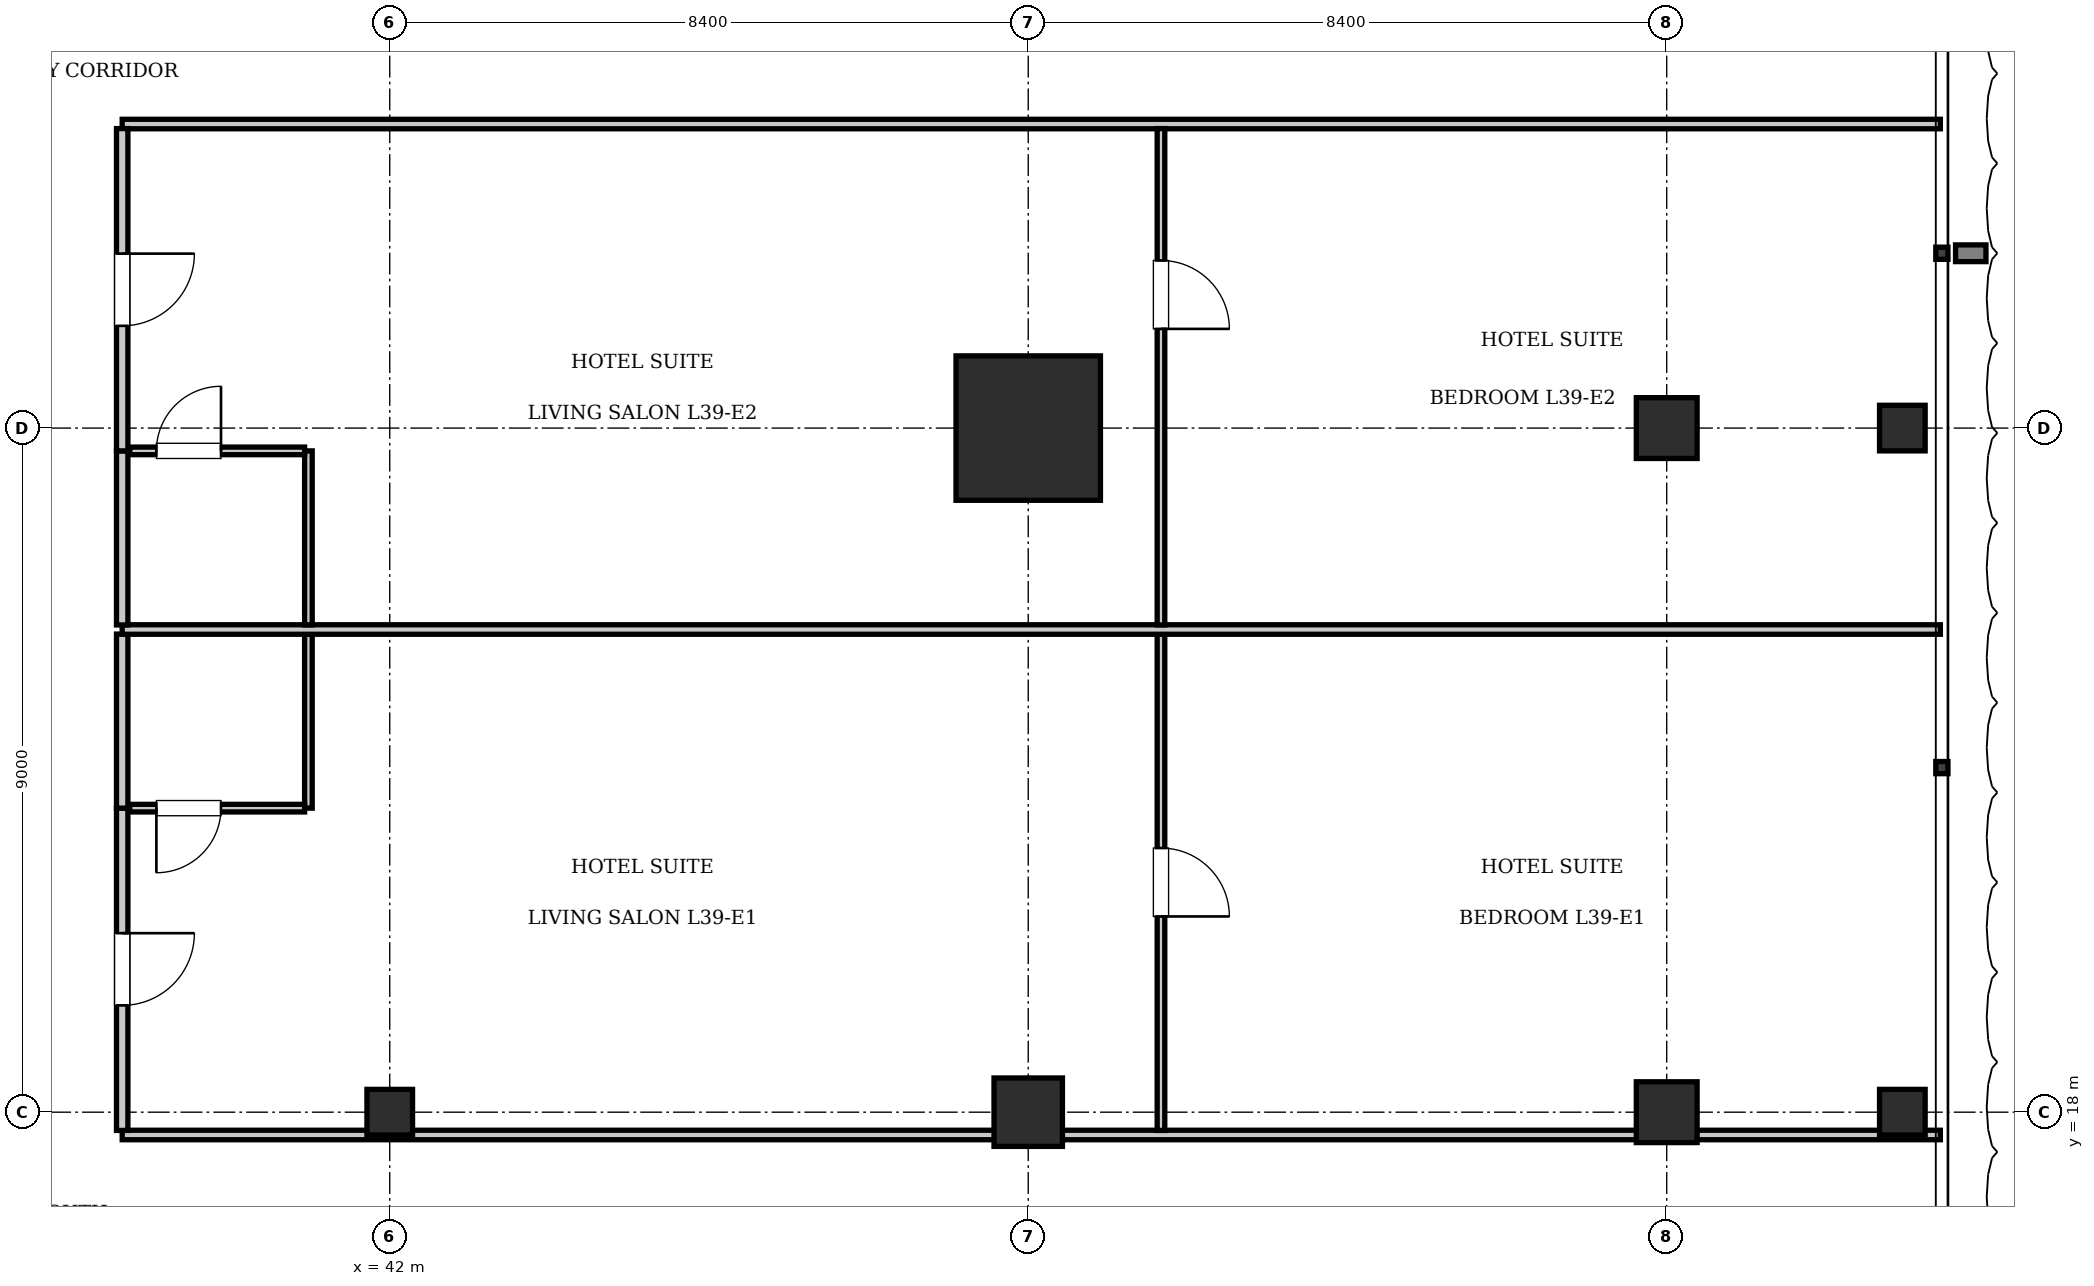
"""IFC4 building model, lengths in metres.
Left out: names, types, materials, properties, quantities, classifications, styles, units other than length and angle.
Written with IfcOpenShell. Run it as: python <this file> out.ifc"""

import sys

from ifc_helpers import new_model, si_unit, direction, frame, frame_2d, origin, origin_2d, place, context, subcontext, project, spatial, rectangle, i_section, extrude, element, fill, save


model = new_model("IFC4")
c1 = context("Model", 3, precision=1e-05, world=origin(), true_north=direction((0.0, 1.0)))
c2 = subcontext(c1, "Body", "Model", "MODEL_VIEW")
j1 = project(units=[si_unit("LENGTHUNIT", "METRE"), si_unit("PLANEANGLEUNIT", "RADIAN")], contexts=[c1])
p1 = place(None, origin())
s1 = spatial("IfcSite", under=j1, at=p1, CompositionType="ELEMENT")
p2 = place(p1, origin())
s2 = spatial("IfcBuilding", under=s1, at=p2, CompositionType="ELEMENT")
p3 = place(p2, frame((0.0, 0.0, 162.05)))
s3 = spatial("IfcBuildingStorey", under=s2, at=p3, CompositionType="ELEMENT", Elevation=162.05)
p4 = place(p3, frame((50.4, 27.0, 0.0), z_axis=(0.0, 0.0, 1.0), x_axis=(1.0, 0.0, 0.0)))
e1 = element("IfcColumn", 1, at=p4, inside=s3, PredefinedType="COLUMN", context=c2, shape_type="SweptSolid", body=[
    extrude(rectangle(XDim=1.9, YDim=1.9, at=origin_2d()), origin(), (0.0, 0.0, 1.0), 3.85),
])
p5 = place(p3, frame((50.4, 18.0, 0.0), z_axis=(0.0, 0.0, 1.0), x_axis=(1.0, 0.0, 0.0)))
e2 = element("IfcColumn", 2, at=p5, inside=s3, PredefinedType="COLUMN", context=c2, shape_type="SweptSolid", body=[
    extrude(rectangle(XDim=0.9, YDim=0.9, at=origin_2d()), origin(), (0.0, 0.0, 1.0), 3.85),
])
p6 = place(p3, frame((42.0, 18.0, 0.0), z_axis=(0.0, 0.0, 1.0), x_axis=(1.0, 0.0, 0.0)))
e3 = element("IfcColumn", 3, at=p6, inside=s3, PredefinedType="COLUMN", context=c2, shape_type="SweptSolid", body=[
    extrude(i_section(OverallWidth=0.6, OverallDepth=0.6, WebThickness=0.025, FlangeThickness=0.038, at=origin_2d()), origin(), (0.0, 0.0, 1.0), 3.85),
])
for number, where, z_axis, x_axis in (
    (4, (58.8, 18.0, 0.0), (0.0, 0.0, 1.0), (1.0, 0.0, 0.0)),
    (5, (58.8, 27.0, 0.0), (0.0, 0.0, 1.0), (1.0, 0.0, 0.0)),
):
    element("IfcColumn", number, at=place(p3, frame(where, z_axis=z_axis, x_axis=x_axis)), inside=s3, PredefinedType="COLUMN", context=c2, shape_type="SweptSolid", body=[
        extrude(rectangle(XDim=0.8, YDim=0.8, at=origin_2d()), origin(), (0.0, 0.0, 1.0), 3.85),
    ])
for number, where, z_axis, x_axis in (
    (6, (61.9, 18.0, 0.0), (0.0, 0.0, 1.0), (1.0, 0.0, 0.0)),
    (7, (61.9, 27.0, 0.0), (0.0, 0.0, 1.0), (1.0, 0.0, 0.0)),
):
    element("IfcColumn", number, at=place(p3, frame(where, z_axis=z_axis, x_axis=x_axis)), inside=s3, PredefinedType="COLUMN", context=c2, shape_type="SweptSolid", body=[
        extrude(i_section(OverallWidth=0.6, OverallDepth=0.6, WebThickness=0.025, FlangeThickness=0.038, at=origin_2d()), origin(), (0.0, 0.0, 1.0), 3.85),
    ])
for number, where, z_axis, x_axis in (
    (8, (38.48, 17.7, 0.0), (0.0, 0.0, 1.0), (1.0, 0.0, 0.0)),
    (9, (38.48, 31.0, 0.0), (0.0, 0.0, 1.0), (1.0, 0.0, 0.0)),
):
    element("IfcWall", number, at=place(p3, frame(where, z_axis=z_axis, x_axis=x_axis)), inside=s3, PredefinedType="PARTITIONING", context=c2, shape_type="SweptSolid", body=[
        extrude(rectangle(XDim=23.92, YDim=0.125, at=frame_2d((11.96, 0.0))), origin(), (0.0, 0.0, 1.0), 3.61),
    ])
p7 = place(p3, frame((38.48, 17.76, 0.0), z_axis=(0.0, 0.0, 1.0), x_axis=(0.0, 1.0, 0.0)))
e10 = element("IfcWall", 10, at=p7, inside=s3, PredefinedType="PARTITIONING", context=c2, shape_type="SweptSolid", body=[
    extrude(rectangle(XDim=4.24, YDim=0.15, at=frame_2d((2.12, 0.0))), origin(), (0.0, 0.0, 1.0), 3.61),
])
p8 = place(p7, frame((1.645, 0.0, 0.0)))
e11 = element("IfcOpeningElement", 11, at=p8, cuts=e10, PredefinedType="OPENING", context=c2, shape_type="SweptSolid", body=[
    extrude(rectangle(XDim=0.95, YDim=2.15, at=frame_2d((0.475, 1.075))), frame((0.0, 0.085, 0.0), z_axis=(0.0, -1.0, 0.0), x_axis=(1.0, 0.0, 0.0)), (0.0, 0.0, 1.0), 0.17),
])
p9 = place(p3, frame((38.48, 22.0, 0.0), z_axis=(0.0, 0.0, 1.0), x_axis=(0.0, 1.0, 0.0)))
e12 = element("IfcWall", 12, at=p9, inside=s3, PredefinedType="PARTITIONING", context=c2, shape_type="SweptSolid", body=[
    extrude(rectangle(XDim=2.29, YDim=0.15, at=frame_2d((1.145, 0.0))), origin(), (0.0, 0.0, 1.0), 3.61),
])
p10 = place(p3, frame((40.93, 22.0, 0.0), z_axis=(0.0, 0.0, 1.0), x_axis=(0.0, 1.0, 0.0)))
e13 = element("IfcWall", 13, at=p10, inside=s3, PredefinedType="PARTITIONING", context=c2, shape_type="SweptSolid", body=[
    extrude(rectangle(XDim=2.29, YDim=0.1, at=frame_2d((1.145, 0.0))), origin(), (0.0, 0.0, 1.0), 3.61),
])
p11 = place(p3, frame((38.58, 22.0, 0.0), z_axis=(0.0, 0.0, 1.0), x_axis=(1.0, 0.0, 0.0)))
e14 = element("IfcWall", 14, at=p11, inside=s3, PredefinedType="PARTITIONING", context=c2, shape_type="SweptSolid", body=[
    extrude(rectangle(XDim=2.3, YDim=0.1, at=frame_2d((1.15, 0.0))), origin(), (0.0, 0.0, 1.0), 3.61),
])
p12 = place(p11, frame((0.35, 0.0, 0.0)))
e15 = element("IfcOpeningElement", 15, at=p12, cuts=e14, PredefinedType="OPENING", context=c2, shape_type="SweptSolid", body=[
    extrude(rectangle(XDim=0.85, YDim=2.1, at=frame_2d((0.425, 1.05))), frame((0.0, 0.06, 0.0), z_axis=(0.0, -1.0, 0.0), x_axis=(1.0, 0.0, 0.0)), (0.0, 0.0, 1.0), 0.12),
])
p13 = place(p3, frame((52.146, 17.76, 0.0), z_axis=(0.0, 0.0, 1.0), x_axis=(0.0, 1.0, 0.0)))
e16 = element("IfcWall", 16, at=p13, inside=s3, PredefinedType="PARTITIONING", context=c2, shape_type="SweptSolid", body=[
    extrude(rectangle(XDim=6.53, YDim=0.1, at=frame_2d((3.265, 0.0))), origin(), (0.0, 0.0, 1.0), 3.61),
])
p14 = place(p13, frame((2.815, 0.0, 0.0)))
e17 = element("IfcOpeningElement", 17, at=p14, cuts=e16, PredefinedType="OPENING", context=c2, shape_type="SweptSolid", body=[
    extrude(rectangle(XDim=0.9, YDim=2.1, at=frame_2d((0.45, 1.05))), frame((0.0, 0.06, 0.0), z_axis=(0.0, -1.0, 0.0), x_axis=(1.0, 0.0, 0.0)), (0.0, 0.0, 1.0), 0.12),
])
p15 = place(p3, frame((38.48, 24.35, 0.0), z_axis=(0.0, 0.0, 1.0), x_axis=(1.0, 0.0, 0.0)))
e18 = element("IfcWall", 18, at=p15, inside=s3, PredefinedType="PARTITIONING", context=c2, shape_type="SweptSolid", body=[
    extrude(rectangle(XDim=23.92, YDim=0.125, at=frame_2d((11.96, 0.0))), origin(), (0.0, 0.0, 1.0), 3.61),
])
p16 = place(p3, frame((38.48, 24.41, 0.0), z_axis=(0.0, 0.0, 1.0), x_axis=(0.0, 1.0, 0.0)))
e19 = element("IfcWall", 19, at=p16, inside=s3, PredefinedType="PARTITIONING", context=c2, shape_type="SweptSolid", body=[
    extrude(rectangle(XDim=2.29, YDim=0.15, at=frame_2d((1.145, 0.0))), origin(), (0.0, 0.0, 1.0), 3.61),
])
p17 = place(p3, frame((38.48, 26.7, 0.0), z_axis=(0.0, 0.0, 1.0), x_axis=(0.0, 1.0, 0.0)))
e20 = element("IfcWall", 20, at=p17, inside=s3, PredefinedType="PARTITIONING", context=c2, shape_type="SweptSolid", body=[
    extrude(rectangle(XDim=4.24, YDim=0.15, at=frame_2d((2.12, 0.0))), origin(), (0.0, 0.0, 1.0), 3.61),
])
p18 = place(p17, frame((1.645, 0.0, 0.0)))
e21 = element("IfcOpeningElement", 21, at=p18, cuts=e20, PredefinedType="OPENING", context=c2, shape_type="SweptSolid", body=[
    extrude(rectangle(XDim=0.95, YDim=2.15, at=frame_2d((0.475, 1.075))), frame((0.0, 0.085, 0.0), z_axis=(0.0, -1.0, 0.0), x_axis=(1.0, 0.0, 0.0)), (0.0, 0.0, 1.0), 0.17),
])
p19 = place(p3, frame((40.93, 24.41, 0.0), z_axis=(0.0, 0.0, 1.0), x_axis=(0.0, 1.0, 0.0)))
e22 = element("IfcWall", 22, at=p19, inside=s3, PredefinedType="PARTITIONING", context=c2, shape_type="SweptSolid", body=[
    extrude(rectangle(XDim=2.29, YDim=0.1, at=frame_2d((1.145, 0.0))), origin(), (0.0, 0.0, 1.0), 3.61),
])
p20 = place(p3, frame((38.58, 26.7, 0.0), z_axis=(0.0, 0.0, 1.0), x_axis=(1.0, 0.0, 0.0)))
e23 = element("IfcWall", 23, at=p20, inside=s3, PredefinedType="PARTITIONING", context=c2, shape_type="SweptSolid", body=[
    extrude(rectangle(XDim=2.3, YDim=0.1, at=frame_2d((1.15, 0.0))), origin(), (0.0, 0.0, 1.0), 3.61),
])
p21 = place(p20, frame((0.35, 0.0, 0.0)))
e24 = element("IfcOpeningElement", 24, at=p21, cuts=e23, PredefinedType="OPENING", context=c2, shape_type="SweptSolid", body=[
    extrude(rectangle(XDim=0.85, YDim=2.1, at=frame_2d((0.425, 1.05))), frame((0.0, 0.06, 0.0), z_axis=(0.0, -1.0, 0.0), x_axis=(1.0, 0.0, 0.0)), (0.0, 0.0, 1.0), 0.12),
])
p22 = place(p3, frame((52.146, 24.41, 0.0), z_axis=(0.0, 0.0, 1.0), x_axis=(0.0, 1.0, 0.0)))
e25 = element("IfcWall", 25, at=p22, inside=s3, PredefinedType="PARTITIONING", context=c2, shape_type="SweptSolid", body=[
    extrude(rectangle(XDim=6.53, YDim=0.1, at=frame_2d((3.265, 0.0))), origin(), (0.0, 0.0, 1.0), 3.61),
])
p23 = place(p22, frame((3.895, 0.0, 0.0)))
e26 = element("IfcOpeningElement", 26, at=p23, cuts=e25, PredefinedType="OPENING", context=c2, shape_type="SweptSolid", body=[
    extrude(rectangle(XDim=0.9, YDim=2.1, at=frame_2d((0.45, 1.05))), frame((0.0, 0.06, 0.0), z_axis=(0.0, -1.0, 0.0), x_axis=(1.0, 0.0, 0.0)), (0.0, 0.0, 1.0), 0.12),
])
p24 = place(p12, frame((0.85, 0.0, 0.0), z_axis=(0.0, 0.0, 1.0), x_axis=(-1.0, 0.0, 0.0)))
e27 = element("IfcDoor", 27, at=p24, inside=s3, OperationType="SINGLE_SWING_RIGHT", PredefinedType="DOOR", context=c2, shape_type="SweptSolid", body=[
    extrude(rectangle(XDim=0.85, YDim=2.1, at=frame_2d((0.425, 1.05))), frame((0.0, 0.025, 0.0), z_axis=(0.0, -1.0, 0.0), x_axis=(1.0, 0.0, 0.0)), (0.0, 0.0, 1.0), 0.05),
])
fill(e15, e27)
p25 = place(p8, frame((0.95, 0.0, 0.0), z_axis=(0.0, 0.0, 1.0), x_axis=(-1.0, 0.0, 0.0)))
e28 = element("IfcDoor", 28, at=p25, inside=s3, OperationType="SINGLE_SWING_LEFT", PredefinedType="DOOR", context=c2, shape_type="SweptSolid", body=[
    extrude(rectangle(XDim=0.95, YDim=2.15, at=frame_2d((0.475, 1.075))), frame((0.0, 0.025, 0.0), z_axis=(0.0, -1.0, 0.0), x_axis=(1.0, 0.0, 0.0)), (0.0, 0.0, 1.0), 0.05),
])
fill(e11, e28)
p26 = place(p14, frame((0.9, 0.0, 0.0), z_axis=(0.0, 0.0, 1.0), x_axis=(-1.0, 0.0, 0.0)))
e29 = element("IfcDoor", 29, at=p26, inside=s3, OperationType="SINGLE_SWING_RIGHT", PredefinedType="DOOR", context=c2, shape_type="SweptSolid", body=[
    extrude(rectangle(XDim=0.9, YDim=2.1, at=frame_2d((0.45, 1.05))), frame((0.0, 0.025, 0.0), z_axis=(0.0, -1.0, 0.0), x_axis=(1.0, 0.0, 0.0)), (0.0, 0.0, 1.0), 0.05),
])
fill(e17, e29)
p27 = place(p21, origin())
e30 = element("IfcDoor", 30, at=p27, inside=s3, OperationType="SINGLE_SWING_RIGHT", PredefinedType="DOOR", context=c2, shape_type="SweptSolid", body=[
    extrude(rectangle(XDim=0.85, YDim=2.1, at=frame_2d((0.425, 1.05))), frame((0.0, 0.025, 0.0), z_axis=(0.0, -1.0, 0.0), x_axis=(1.0, 0.0, 0.0)), (0.0, 0.0, 1.0), 0.05),
])
fill(e24, e30)
p28 = place(p18, frame((0.95, 0.0, 0.0), z_axis=(0.0, 0.0, 1.0), x_axis=(-1.0, 0.0, 0.0)))
e31 = element("IfcDoor", 31, at=p28, inside=s3, OperationType="SINGLE_SWING_LEFT", PredefinedType="DOOR", context=c2, shape_type="SweptSolid", body=[
    extrude(rectangle(XDim=0.95, YDim=2.15, at=frame_2d((0.475, 1.075))), frame((0.0, 0.025, 0.0), z_axis=(0.0, -1.0, 0.0), x_axis=(1.0, 0.0, 0.0)), (0.0, 0.0, 1.0), 0.05),
])
fill(e21, e31)
p29 = place(p23, frame((0.9, 0.0, 0.0), z_axis=(0.0, 0.0, 1.0), x_axis=(-1.0, 0.0, 0.0)))
e32 = element("IfcDoor", 32, at=p29, inside=s3, OperationType="SINGLE_SWING_RIGHT", PredefinedType="DOOR", context=c2, shape_type="SweptSolid", body=[
    extrude(rectangle(XDim=0.9, YDim=2.1, at=frame_2d((0.45, 1.05))), frame((0.0, 0.025, 0.0), z_axis=(0.0, -1.0, 0.0), x_axis=(1.0, 0.0, 0.0)), (0.0, 0.0, 1.0), 0.05),
])
fill(e26, e32)
save(model, sys.argv[1])
